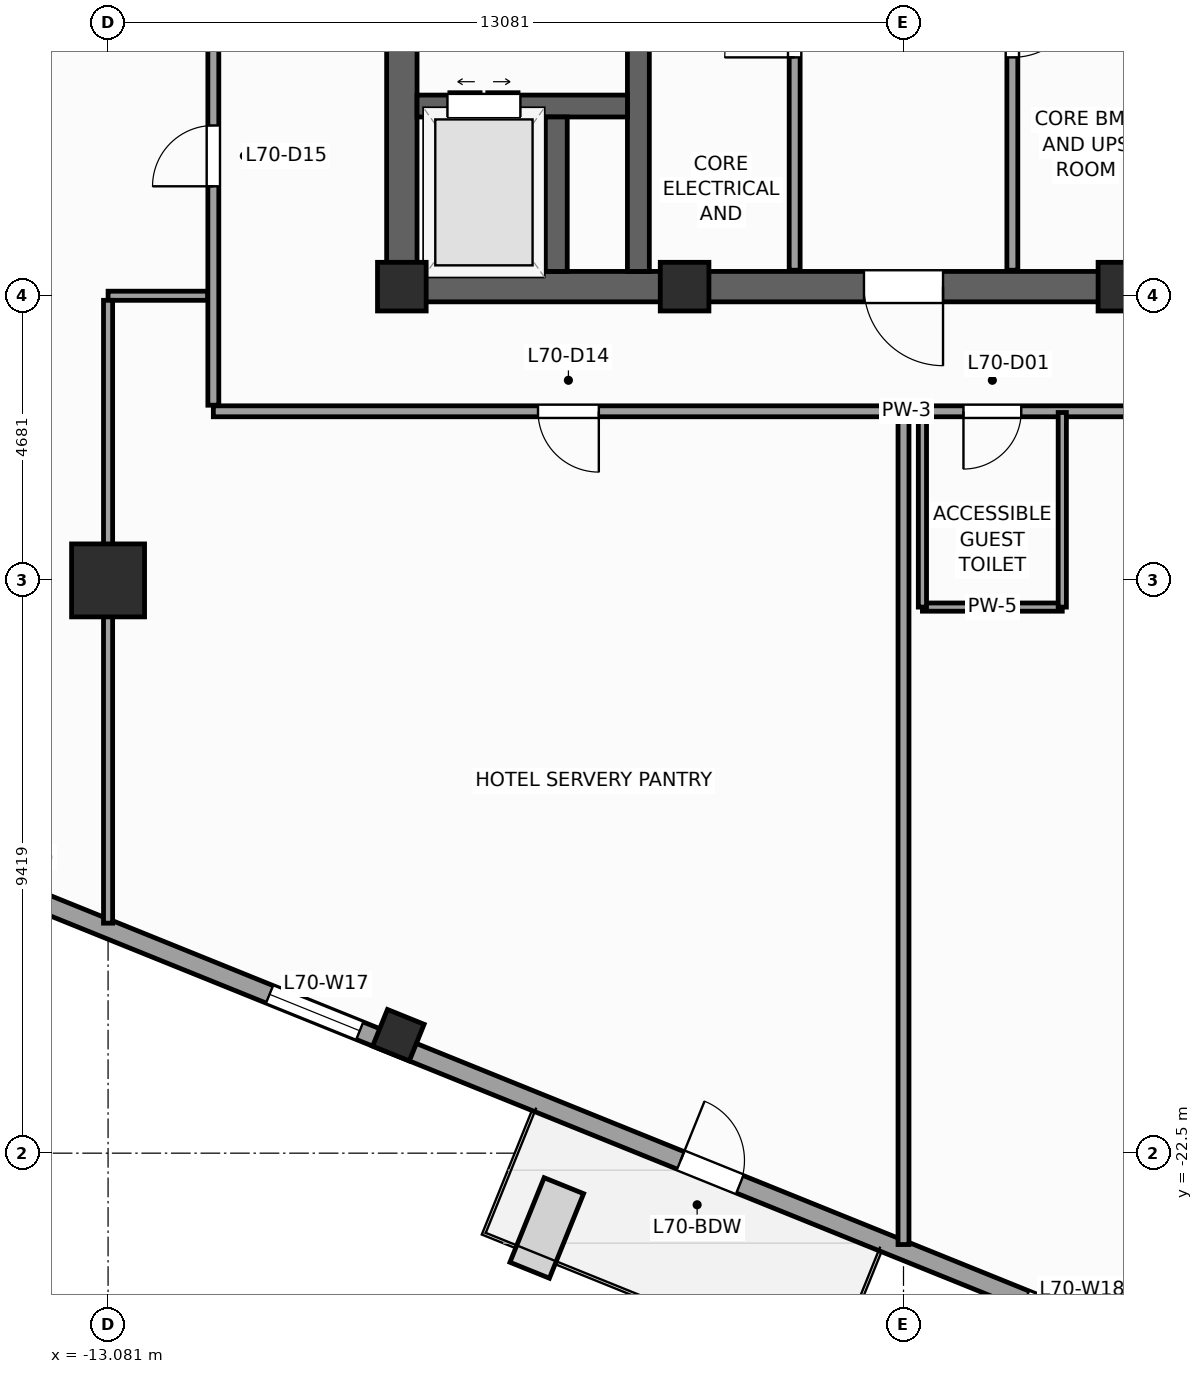
"""IFC4 building model, lengths in metres.
Left out: names, types, materials, properties, quantities, classifications, styles, units other than length and angle.
Written with IfcOpenShell. Run it as: python <this file> out.ifc"""

import sys

from ifc_helpers import new_model, si_unit, direction, frame, frame_2d, origin, origin_2d, place, context, subcontext, project, spatial, rectangle, extrude, source, transform, mapped, element, fill, save


model = new_model("IFC4")
c1 = context("Model", 3, precision=1e-05, world=origin(), true_north=direction((0.0, 1.0)))
c2 = subcontext(c1, "Body", "Model", "MODEL_VIEW")
j1 = project(units=[si_unit("LENGTHUNIT", "METRE"), si_unit("PLANEANGLEUNIT", "RADIAN")], contexts=[c1])
p1 = place(None, origin())
s1 = spatial("IfcSite", under=j1, at=p1, CompositionType="ELEMENT")
p2 = place(p1, origin())
s2 = spatial("IfcBuilding", under=s1, at=p2, CompositionType="ELEMENT")
p3 = place(p2, frame((0.0, 0.0, 286.8)))
s3 = spatial("IfcBuildingStorey", under=s2, at=p3, CompositionType="ELEMENT", Elevation=286.8)
p4 = place(p3, frame((-8.5, -8.25, 0.0), z_axis=(0.0, 0.0, 1.0), x_axis=(1.0, 0.0, 0.0)))
e1 = element("IfcWall", 1, at=p4, inside=s3, PredefinedType="SHEAR", context=c2, shape_type="SweptSolid", body=[
    extrude(rectangle(XDim=17.0, YDim=0.5, at=frame_2d((8.5, 0.0))), origin(), (0.0, 0.0, 1.0), 3.6),
])
p5 = place(p4, frame((7.85, 0.0, 0.0)))
e2 = element("IfcOpeningElement", 2, at=p5, cuts=e1, PredefinedType="OPENING", context=c2, shape_type="SweptSolid", body=[
    extrude(rectangle(XDim=1.3, YDim=2.2, at=frame_2d((0.65, 1.1))), frame((0.0, 0.26, 0.0), z_axis=(0.0, -1.0, 0.0), x_axis=(1.0, 0.0, 0.0)), (0.0, 0.0, 1.0), 0.52),
])
p6 = place(p3, frame((-8.25, -8.0, 0.0), z_axis=(0.0, 0.0, 1.0), x_axis=(0.0, 1.0, 0.0)))
e3 = element("IfcWall", 3, at=p6, inside=s3, PredefinedType="SHEAR", context=c2, shape_type="SweptSolid", body=[
    extrude(rectangle(XDim=16.0, YDim=0.5, at=frame_2d((8.0, 0.0))), origin(), (0.0, 0.0, 1.0), 3.6),
])
p7 = place(p6, frame((4.69, 0.0, 0.0)))
e4 = element("IfcOpeningElement", 4, at=p7, cuts=e3, PredefinedType="OPENING", context=c2, shape_type="SweptSolid", body=[
    extrude(rectangle(XDim=1.3, YDim=2.2, at=frame_2d((0.65, 1.1))), frame((0.0, 0.26, 0.0), z_axis=(0.0, -1.0, 0.0), x_axis=(1.0, 0.0, 0.0)), (0.0, 0.0, 1.0), 0.52),
])
p8 = place(p3, frame((-4.36, -8.0, 0.0), z_axis=(0.0, 0.0, 1.0), x_axis=(0.0, 1.0, 0.0)))
e5 = element("IfcWall", 5, at=p8, inside=s3, PredefinedType="SHEAR", context=c2, shape_type="SweptSolid", body=[
    extrude(rectangle(XDim=16.0, YDim=0.36, at=frame_2d((8.0, 0.0))), origin(), (0.0, 0.0, 1.0), 3.6),
])
p9 = place(p3, frame((-8.0, -5.28, 0.0), z_axis=(0.0, 0.0, 1.0), x_axis=(1.0, 0.0, 0.0)))
e6 = element("IfcWall", 6, at=p9, inside=s3, PredefinedType="SHEAR", context=c2, shape_type="SweptSolid", body=[
    extrude(rectangle(XDim=3.46, YDim=0.36, at=frame_2d((1.73, 0.0))), origin(), (0.0, 0.0, 1.0), 3.6),
])
p10 = place(p9, frame((0.5, 0.0, 0.0)))
e7 = element("IfcOpeningElement", 7, at=p10, cuts=e6, PredefinedType="OPENING", context=c2, shape_type="SweptSolid", body=[
    extrude(rectangle(XDim=1.2, YDim=2.25, at=frame_2d((0.6, 1.125))), frame((0.0, 0.19, 0.0), z_axis=(0.0, -1.0, 0.0), x_axis=(1.0, 0.0, 0.0)), (0.0, 0.0, 1.0), 0.38),
])
p11 = place(p3, frame((-5.71, -8.0, 0.0), z_axis=(0.0, 0.0, 1.0), x_axis=(0.0, 1.0, 0.0)))
e8 = element("IfcWall", 8, at=p11, inside=s3, PredefinedType="SHEAR", context=c2, shape_type="SweptSolid", body=[
    extrude(rectangle(XDim=2.54, YDim=0.36, at=frame_2d((1.27, 0.0))), origin(), (0.0, 0.0, 1.0), 3.6),
])
m1 = source(origin(), c2, "Body", "SweptSolid", [
    extrude(rectangle(XDim=0.8, YDim=0.8, at=origin_2d()), origin(), (0.0, 0.0, 1.0), 3.6),
])
for number, where, z_axis, x_axis in (
    (9, (-8.25, -8.25, 0.0), (0.0, 0.0, 1.0), (1.0, 0.0, 0.0)),
    (10, (-3.6, -8.25, 0.0), (0.0, 0.0, 1.0), (1.0, 0.0, 0.0)),
    (11, (3.6, -8.25, 0.0), (0.0, 0.0, 1.0), (1.0, 0.0, 0.0)),
):
    element("IfcColumn", number, at=place(p3, frame(where, z_axis=z_axis, x_axis=x_axis)), inside=s3, PredefinedType="PILASTER", context=c2, shape_type="MappedRepresentation", body=[
        mapped(m1, transform((0.0, 0.0, 0.0), scale=1.0)),
    ])
m2 = source(origin(), c2, "Body", "SweptSolid", [
    extrude(rectangle(XDim=1.2, YDim=1.2, at=origin_2d()), origin(), (0.0, 0.0, 1.0), 3.6),
])
p12 = place(p3, frame((-13.081, -13.081, 0.0), z_axis=(0.0, 0.0, 1.0), x_axis=(1.0, 0.0, 0.0)))
e12 = element("IfcColumn", 12, at=p12, inside=s3, PredefinedType="COLUMN", context=c2, shape_type="MappedRepresentation", body=[
    mapped(m2, transform((0.0, 0.0, 0.0), scale=1.0)),
])
m3 = source(origin(), c2, "Body", "SweptSolid", [
    extrude(rectangle(XDim=0.65, YDim=0.65, at=origin_2d()), origin(), (0.0, 0.0, 1.0), 3.6),
])
p13 = place(p3, frame((-8.307, -20.56, 0.0), z_axis=(0.0, 0.0, 1.0), x_axis=(0.374606593416, 0.927183854567, 0.0)))
e13 = element("IfcColumn", 13, at=p13, inside=s3, PredefinedType="COLUMN", context=c2, shape_type="MappedRepresentation", body=[
    mapped(m3, transform((0.0, 0.0, 0.0), scale=1.0)),
])
p14 = place(p3, frame((-23.813, -14.479, 0.0), z_axis=(0.0, 0.0, 1.0), x_axis=(0.927182657188, -0.374609557019, 0.0)))
e14 = element("IfcWall", 14, at=p14, inside=s3, PredefinedType="STANDARD", context=c2, shape_type="SweptSolid", body=[
    extrude(rectangle(XDim=33.31, YDim=0.31, at=frame_2d((16.655, 0.0))), origin(), (0.0, 0.0, 1.0), 2.75),
])
p15 = place(p14, frame((21.73, 0.0, 0.0)))
e15 = element("IfcOpeningElement", 15, at=p15, cuts=e14, PredefinedType="OPENING", context=c2, shape_type="SweptSolid", body=[
    extrude(rectangle(XDim=1.05, YDim=2.25, at=frame_2d((0.525, 1.125))), frame((0.0, 0.165, 0.0), z_axis=(0.0, -1.0, 0.0), x_axis=(1.0, 0.0, 0.0)), (0.0, 0.0, 1.0), 0.33),
])
p16 = place(p14, frame((3.197, 0.0, 0.47)))
e16 = element("IfcOpeningElement", 16, at=p16, cuts=e14, PredefinedType="OPENING", context=c2, shape_type="SweptSolid", body=[
    extrude(rectangle(XDim=1.6, YDim=2.1, at=frame_2d((0.8, 1.05))), frame((0.0, 0.165, 0.0), z_axis=(0.0, -1.0, 0.0), x_axis=(1.0, 0.0, 0.0)), (0.0, 0.0, 1.0), 0.33),
])
p17 = place(p14, frame((8.86, 0.0, 0.47)))
e17 = element("IfcOpeningElement", 17, at=p17, cuts=e14, PredefinedType="OPENING", context=c2, shape_type="SweptSolid", body=[
    extrude(rectangle(XDim=1.6, YDim=2.1, at=frame_2d((0.8, 1.05))), frame((0.0, 0.165, 0.0), z_axis=(0.0, -1.0, 0.0), x_axis=(1.0, 0.0, 0.0)), (0.0, 0.0, 1.0), 0.33),
])
p18 = place(p14, frame((14.439, 0.0, 0.47)))
e18 = element("IfcOpeningElement", 18, at=p18, cuts=e14, PredefinedType="OPENING", context=c2, shape_type="SweptSolid", body=[
    extrude(rectangle(XDim=1.6, YDim=2.1, at=frame_2d((0.8, 1.05))), frame((0.0, 0.165, 0.0), z_axis=(0.0, -1.0, 0.0), x_axis=(1.0, 0.0, 0.0)), (0.0, 0.0, 1.0), 0.33),
])
p19 = place(p14, frame((27.847, 0.0, 0.47)))
e19 = element("IfcOpeningElement", 19, at=p19, cuts=e14, PredefinedType="OPENING", context=c2, shape_type="SweptSolid", body=[
    extrude(rectangle(XDim=1.6, YDim=2.1, at=frame_2d((0.8, 1.05))), frame((0.0, 0.165, 0.0), z_axis=(0.0, -1.0, 0.0), x_axis=(1.0, 0.0, 0.0)), (0.0, 0.0, 1.0), 0.33),
])
p20 = place(p3, frame((-1.79, -7.98, 0.0), z_axis=(0.0, 0.0, 1.0), x_axis=(0.0, 1.0, 0.0)))
e20 = element("IfcWall", 20, at=p20, inside=s3, PredefinedType="PARTITIONING", context=c2, shape_type="SweptSolid", body=[
    extrude(rectangle(XDim=12.38, YDim=0.18, at=frame_2d((6.19, 0.0))), origin(), (0.0, 0.0, 1.0), 3.35),
])
p21 = place(p20, frame((8.8, 0.0, 0.0)))
e21 = element("IfcOpeningElement", 21, at=p21, cuts=e20, PredefinedType="OPENING", context=c2, shape_type="SweptSolid", body=[
    extrude(rectangle(XDim=1.1, YDim=2.2, at=frame_2d((0.55, 1.1))), frame((0.0, 0.1, 0.0), z_axis=(0.0, -1.0, 0.0), x_axis=(1.0, 0.0, 0.0)), (0.0, 0.0, 1.0), 0.2),
])
p22 = place(p20, frame((10.86, 0.0, 0.0)))
e22 = element("IfcOpeningElement", 22, at=p22, cuts=e20, PredefinedType="OPENING", context=c2, shape_type="SweptSolid", body=[
    extrude(rectangle(XDim=1.1, YDim=2.2, at=frame_2d((0.55, 1.1))), frame((0.0, 0.1, 0.0), z_axis=(0.0, -1.0, 0.0), x_axis=(1.0, 0.0, 0.0)), (0.0, 0.0, 1.0), 0.2),
])
p23 = place(p20, frame((3.5, 0.0, 0.0)))
e23 = element("IfcOpeningElement", 23, at=p23, cuts=e20, PredefinedType="OPENING", context=c2, shape_type="SweptSolid", body=[
    extrude(rectangle(XDim=1.15, YDim=2.25, at=frame_2d((0.575, 1.125))), frame((0.0, 0.1, 0.0), z_axis=(0.0, -1.0, 0.0), x_axis=(1.0, 0.0, 0.0)), (0.0, 0.0, 1.0), 0.2),
])
p24 = place(p3, frame((1.79, -7.98, 0.0), z_axis=(0.0, 0.0, 1.0), x_axis=(0.0, 1.0, 0.0)))
e24 = element("IfcWall", 24, at=p24, inside=s3, PredefinedType="PARTITIONING", context=c2, shape_type="SweptSolid", body=[
    extrude(rectangle(XDim=12.38, YDim=0.18, at=frame_2d((6.19, 0.0))), origin(), (0.0, 0.0, 1.0), 3.35),
])
p25 = place(p24, frame((8.8, 0.0, 0.0)))
e25 = element("IfcOpeningElement", 25, at=p25, cuts=e24, PredefinedType="OPENING", context=c2, shape_type="SweptSolid", body=[
    extrude(rectangle(XDim=1.1, YDim=2.2, at=frame_2d((0.55, 1.1))), frame((0.0, 0.1, 0.0), z_axis=(0.0, -1.0, 0.0), x_axis=(1.0, 0.0, 0.0)), (0.0, 0.0, 1.0), 0.2),
])
p26 = place(p24, frame((10.86, 0.0, 0.0)))
e26 = element("IfcOpeningElement", 26, at=p26, cuts=e24, PredefinedType="OPENING", context=c2, shape_type="SweptSolid", body=[
    extrude(rectangle(XDim=1.1, YDim=2.2, at=frame_2d((0.55, 1.1))), frame((0.0, 0.1, 0.0), z_axis=(0.0, -1.0, 0.0), x_axis=(1.0, 0.0, 0.0)), (0.0, 0.0, 1.0), 0.2),
])
p27 = place(p24, frame((3.5, 0.0, 0.0)))
e27 = element("IfcOpeningElement", 27, at=p27, cuts=e24, PredefinedType="OPENING", context=c2, shape_type="SweptSolid", body=[
    extrude(rectangle(XDim=1.15, YDim=2.25, at=frame_2d((0.575, 1.125))), frame((0.0, 0.1, 0.0), z_axis=(0.0, -1.0, 0.0), x_axis=(1.0, 0.0, 0.0)), (0.0, 0.0, 1.0), 0.2),
])
p28 = place(p3, frame((-11.35, -10.3, 0.0), z_axis=(0.0, 0.0, 1.0), x_axis=(1.0, 0.0, 0.0)))
e28 = element("IfcWall", 28, at=p28, inside=s3, PredefinedType="PARTITIONING", context=c2, shape_type="SweptSolid", body=[
    extrude(rectangle(XDim=22.8, YDim=0.18, at=frame_2d((11.4, 0.0))), origin(), (0.0, 0.0, 1.0), 3.35),
])
p29 = place(p28, frame((12.336, 0.0, 0.0)))
e29 = element("IfcOpeningElement", 29, at=p29, cuts=e28, PredefinedType="OPENING", context=c2, shape_type="SweptSolid", body=[
    extrude(rectangle(XDim=0.95, YDim=2.1, at=frame_2d((0.475, 1.05))), frame((0.0, 0.1, 0.0), z_axis=(0.0, -1.0, 0.0), x_axis=(1.0, 0.0, 0.0)), (0.0, 0.0, 1.0), 0.2),
])
p30 = place(p28, frame((17.71, 0.0, 0.0)))
e30 = element("IfcOpeningElement", 30, at=p30, cuts=e28, PredefinedType="OPENING", context=c2, shape_type="SweptSolid", body=[
    extrude(rectangle(XDim=1.0, YDim=2.15, at=frame_2d((0.5, 1.075))), frame((0.0, 0.1, 0.0), z_axis=(0.0, -1.0, 0.0), x_axis=(1.0, 0.0, 0.0)), (0.0, 0.0, 1.0), 0.2),
])
p31 = place(p28, frame((5.339, 0.0, 0.0)))
e31 = element("IfcOpeningElement", 31, at=p31, cuts=e28, PredefinedType="OPENING", context=c2, shape_type="SweptSolid", body=[
    extrude(rectangle(XDim=1.0, YDim=2.15, at=frame_2d((0.5, 1.075))), frame((0.0, 0.1, 0.0), z_axis=(0.0, -1.0, 0.0), x_axis=(1.0, 0.0, 0.0)), (0.0, 0.0, 1.0), 0.2),
])
p32 = place(p3, frame((-11.35, -10.2, 0.0), z_axis=(0.0, 0.0, 1.0), x_axis=(0.0, 1.0, 0.0)))
e32 = element("IfcWall", 32, at=p32, inside=s3, PredefinedType="PARTITIONING", context=c2, shape_type="SweptSolid", body=[
    extrude(rectangle(XDim=22.55, YDim=0.18, at=frame_2d((11.275, 0.0))), origin(), (0.0, 0.0, 1.0), 3.35),
])
p33 = place(p32, frame((11.6, 0.0, 0.0)))
e33 = element("IfcOpeningElement", 33, at=p33, cuts=e32, PredefinedType="OPENING", context=c2, shape_type="SweptSolid", body=[
    extrude(rectangle(XDim=1.0, YDim=2.15, at=frame_2d((0.5, 1.075))), frame((0.0, 0.1, 0.0), z_axis=(0.0, -1.0, 0.0), x_axis=(1.0, 0.0, 0.0)), (0.0, 0.0, 1.0), 0.2),
])
p34 = place(p32, frame((15.8, 0.0, 0.0)))
e34 = element("IfcOpeningElement", 34, at=p34, cuts=e32, PredefinedType="OPENING", context=c2, shape_type="SweptSolid", body=[
    extrude(rectangle(XDim=1.0, YDim=2.15, at=frame_2d((0.5, 1.075))), frame((0.0, 0.1, 0.0), z_axis=(0.0, -1.0, 0.0), x_axis=(1.0, 0.0, 0.0)), (0.0, 0.0, 1.0), 0.2),
])
p35 = place(p32, frame((3.6, 0.0, 0.0)))
e35 = element("IfcOpeningElement", 35, at=p35, cuts=e32, PredefinedType="OPENING", context=c2, shape_type="SweptSolid", body=[
    extrude(rectangle(XDim=1.0, YDim=2.15, at=frame_2d((0.5, 1.075))), frame((0.0, 0.1, 0.0), z_axis=(0.0, -1.0, 0.0), x_axis=(1.0, 0.0, 0.0)), (0.0, 0.0, 1.0), 0.2),
])
p36 = place(p32, frame((7.8, 0.0, 0.0)))
e36 = element("IfcOpeningElement", 36, at=p36, cuts=e32, PredefinedType="OPENING", context=c2, shape_type="SweptSolid", body=[
    extrude(rectangle(XDim=1.0, YDim=2.15, at=frame_2d((0.5, 1.075))), frame((0.0, 0.1, 0.0), z_axis=(0.0, -1.0, 0.0), x_axis=(1.0, 0.0, 0.0)), (0.0, 0.0, 1.0), 0.2),
])
p37 = place(p3, frame((0.0, -10.395, 0.0), z_axis=(0.0, 0.0, 1.0), x_axis=(0.0, -1.0, 0.0)))
e37 = element("IfcWall", 37, at=p37, inside=s3, PredefinedType="PARTITIONING", context=c2, shape_type="SweptSolid", body=[
    extrude(rectangle(XDim=13.608, YDim=0.18, at=frame_2d((6.804, 0.0))), origin(), (0.0, 0.0, 1.0), 3.35),
])
p38 = place(p3, frame((-11.445, -8.4, 0.0), z_axis=(0.0, 0.0, 1.0), x_axis=(-1.0, 0.0, 0.0)))
e38 = element("IfcWall", 38, at=p38, inside=s3, PredefinedType="PARTITIONING", context=c2, shape_type="SweptSolid", body=[
    extrude(rectangle(XDim=1.636, YDim=0.15, at=frame_2d((0.818, 0.0))), origin(), (0.0, 0.0, 1.0), 3.35),
])
p39 = place(p3, frame((-13.081, -8.475, 0.0), z_axis=(0.0, 0.0, 1.0), x_axis=(0.0, -1.0, 0.0)))
e39 = element("IfcWall", 39, at=p39, inside=s3, PredefinedType="PARTITIONING", context=c2, shape_type="SweptSolid", body=[
    extrude(rectangle(XDim=10.243, YDim=0.15, at=frame_2d((5.121, 0.0))), origin(), (0.0, 0.0, 1.0), 2.45),
])
p40 = place(p3, frame((0.311, -13.52, 0.0), z_axis=(0.0, 0.0, 1.0), x_axis=(1.0, 0.0, 0.0)))
e40 = element("IfcWall", 40, at=p40, inside=s3, PredefinedType="PARTITIONING", context=c2, shape_type="SweptSolid", body=[
    extrude(rectangle(XDim=2.3, YDim=0.135, at=frame_2d((1.15, 0.0))), origin(), (0.0, 0.0, 1.0), 3.35),
])
for number, where, z_axis, x_axis in (
    (41, (2.611, -13.52, 0.0), (0.0, 0.0, 1.0), (0.0, 1.0, 0.0)),
    (42, (0.311, -13.52, 0.0), (0.0, 0.0, 1.0), (0.0, 1.0, 0.0)),
):
    element("IfcWall", number, at=place(p3, frame(where, z_axis=z_axis, x_axis=x_axis)), inside=s3, PredefinedType="PARTITIONING", context=c2, shape_type="SweptSolid", body=[
        extrude(rectangle(XDim=3.2, YDim=0.135, at=frame_2d((1.6, 0.0))), origin(), (0.0, 0.0, 1.0), 3.35),
    ])
m4 = source(origin(), c2, "Body", "SweptSolid", [
    extrude(rectangle(XDim=1.05, YDim=2.25, at=frame_2d((0.525, 1.125))), frame((0.0, 0.025, 0.0), z_axis=(0.0, -1.0, 0.0), x_axis=(1.0, 0.0, 0.0)), (0.0, 0.0, 1.0), 0.05),
])
p41 = place(p15, origin())
e43 = element("IfcDoor", 43, at=p41, inside=s3, OperationType="SINGLE_SWING_LEFT", PredefinedType="DOOR", context=c2, shape_type="MappedRepresentation", body=[
    mapped(m4, transform((0.0, 0.0, 0.0), scale=1.0)),
])
fill(e15, e43)
m5 = source(origin(), c2, "Body", "SweptSolid", [
    extrude(rectangle(XDim=1.6, YDim=2.1, at=frame_2d((0.8, 1.05))), frame((0.0, 0.03, 0.0), z_axis=(0.0, -1.0, 0.0), x_axis=(1.0, 0.0, 0.0)), (0.0, 0.0, 1.0), 0.06),
])
p42 = place(p18, origin())
e44 = element("IfcWindow", 44, at=p42, inside=s3, PartitioningType="SINGLE_PANEL", PredefinedType="WINDOW", context=c2, shape_type="MappedRepresentation", body=[
    mapped(m5, transform((0.0, 0.0, 0.0), scale=1.0)),
])
fill(e18, e44)
m6 = source(origin(), c2, "Body", "SweptSolid", [
    extrude(rectangle(XDim=1.3, YDim=2.2, at=frame_2d((0.65, 1.1))), frame((0.0, 0.025, 0.0), z_axis=(0.0, -1.0, 0.0), x_axis=(1.0, 0.0, 0.0)), (0.0, 0.0, 1.0), 0.05),
])
p43 = place(p5, frame((1.3, 0.0, 0.0), z_axis=(0.0, 0.0, 1.0), x_axis=(-1.0, 0.0, 0.0)))
e45 = element("IfcDoor", 45, at=p43, inside=s3, OperationType="SINGLE_SWING_RIGHT", PredefinedType="DOOR", context=c2, shape_type="MappedRepresentation", body=[
    mapped(m6, transform((0.0, 0.0, 0.0), scale=1.0)),
])
fill(e2, e45)
m7 = source(origin(), c2, "Body", "SweptSolid", [
    extrude(rectangle(XDim=1.2, YDim=2.25, at=frame_2d((0.6, 1.125))), frame((0.0, 0.025, 0.0), z_axis=(0.0, -1.0, 0.0), x_axis=(1.0, 0.0, 0.0)), (0.0, 0.0, 1.0), 0.05),
])
p44 = place(p10, origin())
e46 = element("IfcDoor", 46, at=p44, inside=s3, OperationType="DOUBLE_DOOR_SLIDING", PredefinedType="DOOR", context=c2, shape_type="MappedRepresentation", body=[
    mapped(m7, transform((0.0, 0.0, 0.0), scale=1.0)),
])
fill(e7, e46)
m8 = source(origin(), c2, "Body", "SweptSolid", [
    extrude(rectangle(XDim=1.15, YDim=2.25, at=frame_2d((0.575, 1.125))), frame((0.0, 0.025, 0.0), z_axis=(0.0, -1.0, 0.0), x_axis=(1.0, 0.0, 0.0)), (0.0, 0.0, 1.0), 0.05),
])
p45 = place(p23, origin())
e47 = element("IfcDoor", 47, at=p45, inside=s3, OperationType="SINGLE_SWING_LEFT", PredefinedType="DOOR", context=c2, shape_type="MappedRepresentation", body=[
    mapped(m8, transform((0.0, 0.0, 0.0), scale=1.0)),
])
fill(e23, e47)
p46 = place(p27, frame((1.15, 0.0, 0.0), z_axis=(0.0, 0.0, 1.0), x_axis=(-1.0, 0.0, 0.0)))
e48 = element("IfcDoor", 48, at=p46, inside=s3, OperationType="SINGLE_SWING_RIGHT", PredefinedType="DOOR", context=c2, shape_type="MappedRepresentation", body=[
    mapped(m8, transform((0.0, 0.0, 0.0), scale=1.0)),
])
fill(e27, e48)
m9 = source(origin(), c2, "Body", "SweptSolid", [
    extrude(rectangle(XDim=0.95, YDim=2.1, at=frame_2d((0.475, 1.05))), frame((0.0, 0.025, 0.0), z_axis=(0.0, -1.0, 0.0), x_axis=(1.0, 0.0, 0.0)), (0.0, 0.0, 1.0), 0.05),
])
p47 = place(p29, frame((0.95, 0.0, 0.0), z_axis=(0.0, 0.0, 1.0), x_axis=(-1.0, 0.0, 0.0)))
e49 = element("IfcDoor", 49, at=p47, inside=s3, OperationType="SINGLE_SWING_LEFT", PredefinedType="DOOR", context=c2, shape_type="MappedRepresentation", body=[
    mapped(m9, transform((0.0, 0.0, 0.0), scale=1.0)),
])
fill(e29, e49)
m10 = source(origin(), c2, "Body", "SweptSolid", [
    extrude(rectangle(XDim=1.0, YDim=2.15, at=frame_2d((0.5, 1.075))), frame((0.0, 0.025, 0.0), z_axis=(0.0, -1.0, 0.0), x_axis=(1.0, 0.0, 0.0)), (0.0, 0.0, 1.0), 0.05),
])
p48 = place(p31, frame((1.0, 0.0, 0.0), z_axis=(0.0, 0.0, 1.0), x_axis=(-1.0, 0.0, 0.0)))
e50 = element("IfcDoor", 50, at=p48, inside=s3, OperationType="SINGLE_SWING_RIGHT", PredefinedType="DOOR", context=c2, shape_type="MappedRepresentation", body=[
    mapped(m10, transform((0.0, 0.0, 0.0), scale=1.0)),
])
fill(e31, e50)
p49 = place(p35, origin())
e51 = element("IfcDoor", 51, at=p49, inside=s3, OperationType="SINGLE_SWING_LEFT", PredefinedType="DOOR", context=c2, shape_type="MappedRepresentation", body=[
    mapped(m10, transform((0.0, 0.0, 0.0), scale=1.0)),
])
fill(e35, e51)
save(model, sys.argv[1])
